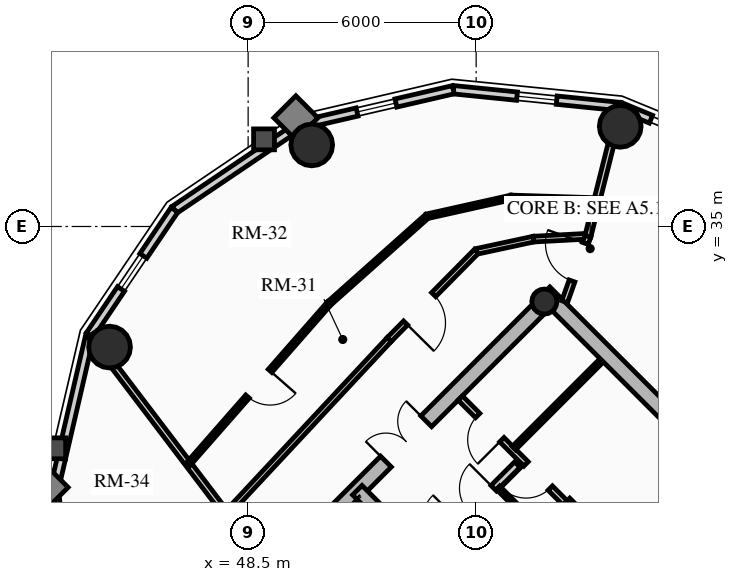
"""IFC4 building model, lengths in metres.
Left out: names, types, materials, properties, quantities, classifications, styles, units other than length and angle.
Written with IfcOpenShell. Run it as: python <this file> out.ifc"""

import sys

from ifc_helpers import new_model, si_unit, direction, frame, frame_2d, origin, origin_2d, place, context, subcontext, project, spatial, rectangle, circle, hollow_circle, extrude, source, transform, mapped, element, fill, save


model = new_model("IFC4")
c1 = context("Model", 3, precision=1e-05, world=origin(), true_north=direction((0.0, 1.0)))
c2 = subcontext(c1, "Body", "Model", "MODEL_VIEW")
j1 = project(units=[si_unit("LENGTHUNIT", "METRE"), si_unit("PLANEANGLEUNIT", "RADIAN")], contexts=[c1])
p1 = place(None, origin())
s1 = spatial("IfcSite", under=j1, at=p1, CompositionType="ELEMENT")
p2 = place(p1, origin())
s2 = spatial("IfcBuilding", under=s1, at=p2, CompositionType="ELEMENT")
p3 = place(p2, frame((0.0, 0.0, 219.94)))
s3 = spatial("IfcBuildingStorey", under=s2, at=p3, CompositionType="ELEMENT", Elevation=219.94)
p4 = place(p3, frame((66.268, 23.298, 0.0), z_axis=(0.0, 0.0, 1.0), x_axis=(-0.707106781187, 0.707106781187, 0.0)))
e1 = element("IfcWall", 1, at=p4, inside=s3, PredefinedType="SHEAR", context=c2, shape_type="SweptSolid", body=[
    extrude(rectangle(XDim=14.1, YDim=0.4, at=frame_2d((7.05, 0.0))), origin(), (0.0, 0.0, 1.0), 2.91),
])
p5 = place(p3, frame((48.873, 25.561, 0.0), z_axis=(0.0, 0.0, 1.0), x_axis=(0.707106781187, 0.707106781187, 0.0)))
e2 = element("IfcWall", 2, at=p5, inside=s3, PredefinedType="SHEAR", context=c2, shape_type="SweptSolid", body=[
    extrude(rectangle(XDim=10.7, YDim=0.4, at=frame_2d((5.35, 0.0))), origin(), (0.0, 0.0, 1.0), 2.91),
])
m1 = source(origin(), c2, "Body", "SweptSolid", [
    extrude(rectangle(XDim=1.5, YDim=2.02, at=frame_2d((0.75, 1.01))), frame((0.0, 0.21, 0.0), z_axis=(0.0, -1.0, 0.0), x_axis=(1.0, 0.0, 0.0)), (0.0, 0.0, 1.0), 0.42),
])
p6 = place(p5, frame((4.6, 0.0, 0.0)))
e3 = element("IfcOpeningElement", 3, at=p6, cuts=e2, PredefinedType="OPENING", context=c2, shape_type="MappedRepresentation", body=[
    mapped(m1, transform((0.0, 0.0, 0.0), x_axis=(1.0, 0.0, 0.0), y_axis=(0.0, 1.0, 0.0), z_axis=(0.0, 0.0, 1.0), scale=1.0)),
])
p7 = place(p3, frame((61.06, 18.373, 0.0), z_axis=(0.0, 0.0, 1.0), x_axis=(-0.707106781187, 0.707106781187, 0.0)))
e4 = element("IfcWall", 4, at=p7, inside=s3, PredefinedType="SHEAR", context=c2, shape_type="SweptSolid", body=[
    extrude(rectangle(XDim=13.7, YDim=0.35, at=frame_2d((6.85, 0.0))), origin(), (0.0, 0.0, 1.0), 2.91),
])
m2 = source(origin(), c2, "Body", "SweptSolid", [
    extrude(rectangle(XDim=1.1, YDim=2.015, at=frame_2d((0.55, 1.007))), frame((0.0, 0.185, 0.0), z_axis=(0.0, -1.0, 0.0), x_axis=(1.0, 0.0, 0.0)), (0.0, 0.0, 1.0), 0.37),
])
p8 = place(p7, frame((4.85, 0.0, 0.0)))
e5 = element("IfcOpeningElement", 5, at=p8, cuts=e4, PredefinedType="OPENING", context=c2, shape_type="MappedRepresentation", body=[
    mapped(m2, transform((0.0, 0.0, 0.0), x_axis=(1.0, 0.0, 0.0), y_axis=(0.0, 1.0, 0.0), z_axis=(0.0, 0.0, 1.0), scale=1.0)),
])
p9 = place(p7, frame((0.625, 0.0, 0.0)))
e6 = element("IfcOpeningElement", 6, at=p9, cuts=e4, PredefinedType="OPENING", context=c2, shape_type="MappedRepresentation", body=[
    mapped(m2, transform((0.0, 0.0, 0.0), x_axis=(1.0, 0.0, 0.0), y_axis=(0.0, 1.0, 0.0), z_axis=(0.0, 0.0, 1.0), scale=1.0)),
])
p10 = place(p7, frame((2.625, 0.0, 0.0)))
e7 = element("IfcOpeningElement", 7, at=p10, cuts=e4, PredefinedType="OPENING", context=c2, shape_type="MappedRepresentation", body=[
    mapped(m2, transform((0.0, 0.0, 0.0), x_axis=(1.0, 0.0, 0.0), y_axis=(0.0, 1.0, 0.0), z_axis=(0.0, 0.0, 1.0), scale=1.0)),
])
m3 = source(origin(), c2, "Body", "SweptSolid", [
    extrude(rectangle(XDim=1.15, YDim=2.02, at=frame_2d((0.575, 1.01))), frame((0.0, 0.185, 0.0), z_axis=(0.0, -1.0, 0.0), x_axis=(1.0, 0.0, 0.0)), (0.0, 0.0, 1.0), 0.37),
])
p11 = place(p7, frame((7.27, 0.0, 0.0)))
e8 = element("IfcOpeningElement", 8, at=p11, cuts=e4, PredefinedType="OPENING", context=c2, shape_type="MappedRepresentation", body=[
    mapped(m3, transform((0.0, 0.0, 0.0), x_axis=(1.0, 0.0, 0.0), y_axis=(0.0, 1.0, 0.0), z_axis=(0.0, 0.0, 1.0), scale=1.0)),
])
p12 = place(p3, frame((63.627, 20.94, 0.0), z_axis=(0.0, 0.0, 1.0), x_axis=(-0.707119496762, 0.707094065383, 0.0)))
e9 = element("IfcWall", 9, at=p12, inside=s3, PredefinedType="SHEAR", context=c2, shape_type="SweptSolid", body=[
    extrude(rectangle(XDim=9.6, YDim=0.35, at=frame_2d((4.8, 0.0))), origin(), (0.0, 0.0, 1.0), 2.91),
])
p13 = place(p12, frame((5.28, 0.0, 0.0)))
e10 = element("IfcOpeningElement", 10, at=p13, cuts=e9, PredefinedType="OPENING", context=c2, shape_type="MappedRepresentation", body=[
    mapped(m3, transform((0.0, 0.0, 0.0), x_axis=(1.0, 0.0, 0.0), y_axis=(0.0, 1.0, 0.0), z_axis=(0.0, 0.0, 1.0), scale=1.0)),
])
p14 = place(p3, frame((58.893, 25.674, 0.0), z_axis=(0.0, 0.0, 1.0), x_axis=(0.707106781187, 0.707106781187, 0.0)))
e11 = element("IfcWall", 11, at=p14, inside=s3, PredefinedType="SHEAR", context=c2, shape_type="SweptSolid", body=[
    extrude(rectangle(XDim=3.285, YDim=0.35, at=frame_2d((1.643, 0.0))), origin(), (0.0, 0.0, 1.0), 2.91),
])
p15 = place(p3, frame((56.294, 33.024, 0.0), z_axis=(0.0, 0.0, 1.0), x_axis=(0.707106781187, 0.707106781187, 0.0)))
e12 = element("IfcColumn", 12, at=p15, inside=s3, PredefinedType="COLUMN", context=c2, shape_type="SweptSolid", body=[
    extrude(hollow_circle(Radius=0.33, WallThickness=0.025, at=origin_2d()), origin(), (0.0, 0.0, 1.0), 2.91),
])
for number, where, z_axis, x_axis in (
    (13, (58.291, 37.635, 0.0), (0.0, 0.0, 1.0), (1.0, 0.0, 0.0)),
    (14, (50.173, 37.146, 0.0), (0.0, 0.0, 1.0), (1.0, 0.0, 0.0)),
    (15, (44.854, 31.827, 0.0), (0.0, 0.0, 1.0), (1.0, 0.0, 0.0)),
):
    element("IfcColumn", number, at=place(p3, frame(where, z_axis=z_axis, x_axis=x_axis)), inside=s3, PredefinedType="USERDEFINED", context=c2, shape_type="SweptSolid", body=[
        extrude(circle(Radius=0.55, at=origin_2d()), origin(), (0.0, 0.0, 1.0), 2.91),
    ])
p16 = place(p3, frame((58.295, 38.155, 0.0), z_axis=(0.0, 0.0, 1.0), x_axis=(0.924515260676, -0.381145028536, 0.0)))
e16 = element("IfcWall", 16, at=p16, inside=s3, PredefinedType="SOLIDWALL", context=c2, shape_type="SweptSolid", body=[
    extrude(rectangle(XDim=0.87, YDim=0.22, at=frame_2d((0.435, 0.0))), origin(), (0.0, 0.0, 1.0), 2.322),
])
p17 = place(p3, frame((53.9, 38.599, 0.0), z_axis=(0.0, 0.0, 1.0), x_axis=(0.994929930991, -0.100570534541, 0.0)))
e17 = element("IfcWall", 17, at=p17, inside=s3, PredefinedType="SOLIDWALL", context=c2, shape_type="SweptSolid", body=[
    extrude(rectangle(XDim=4.418, YDim=0.22, at=frame_2d((2.209, 0.0))), origin(), (0.0, 0.0, 1.0), 2.322),
])
m4 = source(origin(), c2, "Body", "SweptSolid", [
    extrude(rectangle(XDim=1.05, YDim=1.3, at=frame_2d((0.525, 0.65))), frame((0.0, 0.12, 0.0), z_axis=(0.0, -1.0, 0.0), x_axis=(1.0, 0.0, 0.0)), (0.0, 0.0, 1.0), 0.24),
])
p18 = place(p17, frame((1.684, 0.0, 0.65)))
e18 = element("IfcOpeningElement", 18, at=p18, cuts=e17, PredefinedType="OPENING", context=c2, shape_type="MappedRepresentation", body=[
    mapped(m4, transform((0.0, 0.0, 0.0), x_axis=(1.0, 0.0, 0.0), y_axis=(0.0, 1.0, 0.0), z_axis=(0.0, 0.0, 1.0), scale=1.0)),
])
p19 = place(p3, frame((49.856, 37.663, 0.0), z_axis=(0.0, 0.0, 1.0), x_axis=(0.974249228678, 0.225473813158, 0.0)))
e19 = element("IfcWall", 19, at=p19, inside=s3, PredefinedType="SOLIDWALL", context=c2, shape_type="SweptSolid", body=[
    extrude(rectangle(XDim=4.15, YDim=0.22, at=frame_2d((2.075, 0.0))), origin(), (0.0, 0.0, 1.0), 2.322),
])
p20 = place(p19, frame((1.55, 0.0, 0.65)))
e20 = element("IfcOpeningElement", 20, at=p20, cuts=e19, PredefinedType="OPENING", context=c2, shape_type="MappedRepresentation", body=[
    mapped(m4, transform((0.0, 0.0, 0.0), x_axis=(1.0, 0.0, 0.0), y_axis=(0.0, 1.0, 0.0), z_axis=(0.0, 0.0, 1.0), scale=1.0)),
])
p21 = place(p3, frame((46.561, 35.439, 0.0), z_axis=(0.0, 0.0, 1.0), x_axis=(0.828833723692, 0.559495003079, 0.0)))
e21 = element("IfcWall", 21, at=p21, inside=s3, PredefinedType="SOLIDWALL", context=c2, shape_type="SweptSolid", body=[
    extrude(rectangle(XDim=3.976, YDim=0.22, at=frame_2d((1.988, 0.0))), origin(), (0.0, 0.0, 1.0), 2.322),
])
p22 = place(p3, frame((44.337, 32.144, 0.0), z_axis=(0.0, 0.0, 1.0), x_axis=(0.559495003079, 0.828833723692, 0.0)))
e22 = element("IfcWall", 22, at=p22, inside=s3, PredefinedType="SOLIDWALL", context=c2, shape_type="SweptSolid", body=[
    extrude(rectangle(XDim=3.976, YDim=0.22, at=frame_2d((1.988, 0.0))), origin(), (0.0, 0.0, 1.0), 2.322),
])
p23 = place(p22, frame((1.463, 0.0, 0.65)))
e23 = element("IfcOpeningElement", 23, at=p23, cuts=e22, PredefinedType="OPENING", context=c2, shape_type="MappedRepresentation", body=[
    mapped(m4, transform((0.0, 0.0, 0.0), x_axis=(1.0, 0.0, 0.0), y_axis=(0.0, 1.0, 0.0), z_axis=(0.0, 0.0, 1.0), scale=1.0)),
])
p24 = place(p3, frame((43.401, 28.1, 0.0), z_axis=(0.0, 0.0, 1.0), x_axis=(0.225473813158, 0.974249228678, 0.0)))
e24 = element("IfcWall", 24, at=p24, inside=s3, PredefinedType="SOLIDWALL", context=c2, shape_type="SweptSolid", body=[
    extrude(rectangle(XDim=4.15, YDim=0.22, at=frame_2d((2.075, 0.0))), origin(), (0.0, 0.0, 1.0), 2.322),
])
p25 = place(p3, frame((43.845, 23.705, 0.0), z_axis=(0.0, 0.0, 1.0), x_axis=(-0.100570534541, 0.994929930991, 0.0)))
e25 = element("IfcWall", 25, at=p25, inside=s3, PredefinedType="SOLIDWALL", context=c2, shape_type="SweptSolid", body=[
    extrude(rectangle(XDim=4.418, YDim=0.22, at=frame_2d((2.209, 0.0))), origin(), (0.0, 0.0, 1.0), 2.322),
])
p26 = place(p25, frame((1.684, 0.0, 0.65)))
e26 = element("IfcOpeningElement", 26, at=p26, cuts=e25, PredefinedType="OPENING", context=c2, shape_type="MappedRepresentation", body=[
    mapped(m4, transform((0.0, 0.0, 0.0), x_axis=(1.0, 0.0, 0.0), y_axis=(0.0, 1.0, 0.0), z_axis=(0.0, 0.0, 1.0), scale=1.0)),
])
p27 = place(p3, frame((53.264, 26.416, 0.0), z_axis=(0.0, 0.0, 1.0), x_axis=(0.707106781187, 0.707106781187, 0.0)))
e27 = element("IfcWall", 27, at=p27, inside=s3, PredefinedType="PARTITIONING", context=c2, shape_type="SweptSolid", body=[
    extrude(rectangle(XDim=3.28, YDim=0.2, at=frame_2d((1.64, 0.0))), origin(), (0.0, 0.0, 1.0), 2.685),
])
m5 = source(origin(), c2, "Body", "SweptSolid", [
    extrude(rectangle(XDim=1.0, YDim=2.015, at=frame_2d((0.5, 1.007))), frame((0.0, 0.11, 0.0), z_axis=(0.0, -1.0, 0.0), x_axis=(1.0, 0.0, 0.0)), (0.0, 0.0, 1.0), 0.22),
])
p28 = place(p27, frame((0.14, 0.0, 0.0)))
e28 = element("IfcOpeningElement", 28, at=p28, cuts=e27, PredefinedType="OPENING", context=c2, shape_type="MappedRepresentation", body=[
    mapped(m5, transform((0.0, 0.0, 0.0), x_axis=(1.0, 0.0, 0.0), y_axis=(0.0, 1.0, 0.0), z_axis=(0.0, 0.0, 1.0), scale=1.0)),
])
m6 = source(origin(), c2, "Body", "SweptSolid", [
    extrude(rectangle(XDim=0.9, YDim=2.005, at=frame_2d((0.45, 1.002))), frame((0.0, 0.11, 0.0), z_axis=(0.0, -1.0, 0.0), x_axis=(1.0, 0.0, 0.0)), (0.0, 0.0, 1.0), 0.22),
])
p29 = place(p27, frame((1.5, 0.0, 0.0)))
e29 = element("IfcOpeningElement", 29, at=p29, cuts=e27, PredefinedType="OPENING", context=c2, shape_type="MappedRepresentation", body=[
    mapped(m6, transform((0.0, 0.0, 0.0), x_axis=(1.0, 0.0, 0.0), y_axis=(0.0, 1.0, 0.0), z_axis=(0.0, 0.0, 1.0), scale=1.0)),
])
p30 = place(p3, frame((56.673, 26.529, 0.0), z_axis=(0.0, 0.0, 1.0), x_axis=(-0.707052764397, 0.70716079385, 0.0)))
e30 = element("IfcWall", 30, at=p30, inside=s3, PredefinedType="PARTITIONING", context=c2, shape_type="SweptSolid", body=[
    extrude(rectangle(XDim=2.26, YDim=0.125, at=frame_2d((1.13, 0.0))), origin(), (0.0, 0.0, 1.0), 2.685),
])
m7 = source(origin(), c2, "Body", "SweptSolid", [
    extrude(rectangle(XDim=0.9, YDim=2.005, at=frame_2d((0.45, 1.002))), frame((0.0, 0.073, 0.0), z_axis=(0.0, -1.0, 0.0), x_axis=(1.0, 0.0, 0.0)), (0.0, 0.0, 1.0), 0.145),
])
p31 = place(p30, frame((0.65, 0.0, 0.0)))
e31 = element("IfcOpeningElement", 31, at=p31, cuts=e30, PredefinedType="OPENING", context=c2, shape_type="MappedRepresentation", body=[
    mapped(m7, transform((0.0, 0.0, 0.0), x_axis=(1.0, 0.0, 0.0), y_axis=(0.0, 1.0, 0.0), z_axis=(0.0, 0.0, 1.0), scale=1.0)),
])
p32 = place(p3, frame((56.839, 27.728, 0.0), z_axis=(0.0, 0.0, 1.0), x_axis=(-0.707106781187, 0.707106781187, 0.0)))
e32 = element("IfcWall", 32, at=p32, inside=s3, PredefinedType="PARTITIONING", context=c2, shape_type="SweptSolid", body=[
    extrude(rectangle(XDim=3.9, YDim=0.16, at=frame_2d((1.95, 0.0))), origin(), (0.0, 0.0, 1.0), 2.685),
])
m8 = source(origin(), c2, "Body", "SweptSolid", [
    extrude(rectangle(XDim=0.9, YDim=2.005, at=frame_2d((0.45, 1.002))), frame((0.0, 0.09, 0.0), z_axis=(0.0, -1.0, 0.0), x_axis=(1.0, 0.0, 0.0)), (0.0, 0.0, 1.0), 0.18),
])
p33 = place(p32, frame((0.55, 0.0, 0.0)))
e33 = element("IfcOpeningElement", 33, at=p33, cuts=e32, PredefinedType="OPENING", context=c2, shape_type="MappedRepresentation", body=[
    mapped(m8, transform((0.0, 0.0, 0.0), x_axis=(1.0, 0.0, 0.0), y_axis=(0.0, 1.0, 0.0), z_axis=(0.0, 0.0, 1.0), scale=1.0)),
])
p34 = place(p32, frame((2.35, 0.0, 0.0)))
e34 = element("IfcOpeningElement", 34, at=p34, cuts=e32, PredefinedType="OPENING", context=c2, shape_type="MappedRepresentation", body=[
    mapped(m8, transform((0.0, 0.0, 0.0), x_axis=(1.0, 0.0, 0.0), y_axis=(0.0, 1.0, 0.0), z_axis=(0.0, 0.0, 1.0), scale=1.0)),
])
p35 = place(p3, frame((55.492, 29.167, 0.0), z_axis=(0.0, 0.0, 1.0), x_axis=(0.707144688645, 0.707068871696, 0.0)))
e35 = element("IfcWall", 35, at=p35, inside=s3, PredefinedType="PARTITIONING", context=c2, shape_type="SweptSolid", body=[
    extrude(rectangle(XDim=3.22, YDim=0.125, at=frame_2d((1.61, 0.0))), origin(), (0.0, 0.0, 1.0), 2.222),
])
p36 = place(p3, frame((57.44, 34.744, 0.0), z_axis=(0.0, 0.0, 1.0), x_axis=(-0.998578025565, -0.053309725738, 0.0)))
e36 = element("IfcWall", 36, at=p36, inside=s3, PredefinedType="PARTITIONING", context=c2, shape_type="SweptSolid", body=[
    extrude(rectangle(XDim=1.433, YDim=0.15, at=frame_2d((0.717, 0.0))), origin(), (0.0, 0.0, 1.0), 2.322),
])
p37 = place(p3, frame((56.009, 34.667, 0.0), z_axis=(0.0, 0.0, 1.0), x_axis=(-0.977625498152, -0.210353001795, 0.0)))
e37 = element("IfcWall", 37, at=p37, inside=s3, PredefinedType="PARTITIONING", context=c2, shape_type="SweptSolid", body=[
    extrude(rectangle(XDim=1.538, YDim=0.15, at=frame_2d((0.769, 0.0))), origin(), (0.0, 0.0, 1.0), 2.255),
])
p38 = place(p3, frame((54.506, 34.344, 0.0), z_axis=(0.0, 0.0, 1.0), x_axis=(-0.703053402247, -0.711137056824, 0.0)))
e38 = element("IfcWall", 38, at=p38, inside=s3, PredefinedType="PARTITIONING", context=c2, shape_type="SweptSolid", body=[
    extrude(rectangle(XDim=3.262, YDim=0.15, at=frame_2d((1.631, 0.0))), origin(), (0.0, 0.0, 1.0), 2.322),
])
m9 = source(origin(), c2, "Body", "SweptSolid", [
    extrude(rectangle(XDim=1.05, YDim=2.015, at=frame_2d((0.525, 1.007))), frame((0.0, 0.085, 0.0), z_axis=(0.0, -1.0, 0.0), x_axis=(1.0, 0.0, 0.0)), (0.0, 0.0, 1.0), 0.17),
])
p39 = place(p38, frame((1.599, 0.0, 0.0)))
e39 = element("IfcOpeningElement", 39, at=p39, cuts=e38, PredefinedType="OPENING", context=c2, shape_type="MappedRepresentation", body=[
    mapped(m9, transform((0.0, 0.0, 0.0), x_axis=(1.0, 0.0, 0.0), y_axis=(0.0, 1.0, 0.0), z_axis=(0.0, 0.0, 1.0), scale=1.0)),
])
p40 = place(p3, frame((52.212, 32.024, 0.0), z_axis=(0.0, 0.0, 1.0), x_axis=(-0.682158998173, -0.731203871169, 0.0)))
e40 = element("IfcWall", 40, at=p40, inside=s3, PredefinedType="PARTITIONING", context=c2, shape_type="SweptSolid", body=[
    extrude(rectangle(XDim=6.282, YDim=0.15, at=frame_2d((3.141, 0.0))), origin(), (0.0, 0.0, 1.0), 2.255),
])
p41 = place(p3, frame((57.44, 34.744, 0.0), z_axis=(0.0, 0.0, 1.0), x_axis=(0.243619816457, 0.969870808422, 0.0)))
e41 = element("IfcWall", 41, at=p41, inside=s3, PredefinedType="PARTITIONING", context=c2, shape_type="SweptSolid", body=[
    extrude(rectangle(XDim=3.496, YDim=0.16, at=frame_2d((1.748, 0.0))), origin(), (0.0, 0.0, 1.0), 2.322),
])
p42 = place(p3, frame((47.927, 27.431, 0.0), z_axis=(0.0, 0.0, 1.0), x_axis=(-0.604823333103, 0.796359677366, 0.0)))
e42 = element("IfcWall", 42, at=p42, inside=s3, PredefinedType="PARTITIONING", context=c2, shape_type="SweptSolid", body=[
    extrude(rectangle(XDim=5.907, YDim=0.16, at=frame_2d((2.953, 0.0))), origin(), (0.0, 0.0, 1.0), 2.322),
])
p43 = place(p3, frame((56.828, 33.021, 0.0), z_axis=(0.0, 0.0, 1.0), x_axis=(0.334788446034, 0.942293317605, 0.0)))
e43 = element("IfcWall", 43, at=p43, inside=s3, PredefinedType="PARTITIONING", context=c2, shape_type="SweptSolid", body=[
    extrude(rectangle(XDim=1.829, YDim=0.16, at=frame_2d((0.915, 0.0))), origin(), (0.0, 0.0, 1.0), 2.255),
])
m10 = source(origin(), c2, "Body", "SweptSolid", [
    extrude(rectangle(XDim=1.05, YDim=2.015, at=frame_2d((0.525, 1.007))), frame((0.0, 0.09, 0.0), z_axis=(0.0, -1.0, 0.0), x_axis=(1.0, 0.0, 0.0)), (0.0, 0.0, 1.0), 0.18),
])
p44 = place(p43, frame((0.579, 0.0, 0.0)))
e44 = element("IfcOpeningElement", 44, at=p44, cuts=e43, PredefinedType="OPENING", context=c2, shape_type="MappedRepresentation", body=[
    mapped(m10, transform((0.0, 0.0, 0.0), x_axis=(1.0, 0.0, 0.0), y_axis=(0.0, 1.0, 0.0), z_axis=(0.0, 0.0, 1.0), scale=1.0)),
])
p45 = place(p3, frame((57.679, 35.693, 0.0), z_axis=(0.0, 0.0, 1.0), x_axis=(-0.999526298938, 0.030776252722, 0.0)))
e45 = element("IfcWall", 45, at=p45, inside=s3, PredefinedType="PARTITIONING", context=c2, shape_type="SweptSolid", body=[
    extrude(rectangle(XDim=2.261, YDim=0.125, at=frame_2d((1.13, 0.0))), origin(), (0.0, 0.0, 1.0), 2.322),
])
p46 = place(p3, frame((55.419, 35.763, 0.0), z_axis=(0.0, 0.0, 1.0), x_axis=(-0.975917771425, -0.218138725166, 0.0)))
e46 = element("IfcWall", 46, at=p46, inside=s3, PredefinedType="PARTITIONING", context=c2, shape_type="SweptSolid", body=[
    extrude(rectangle(XDim=2.268, YDim=0.125, at=frame_2d((1.134, 0.0))), origin(), (0.0, 0.0, 1.0), 2.255),
])
p47 = place(p3, frame((53.206, 35.268, 0.0), z_axis=(0.0, 0.0, 1.0), x_axis=(-0.746677760999, -0.665185929819, 0.0)))
e47 = element("IfcWall", 47, at=p47, inside=s3, PredefinedType="PARTITIONING", context=c2, shape_type="SweptSolid", body=[
    extrude(rectangle(XDim=3.445, YDim=0.125, at=frame_2d((1.723, 0.0))), origin(), (0.0, 0.0, 1.0), 2.322),
])
p48 = place(p3, frame((50.634, 32.977, 0.0), z_axis=(0.0, 0.0, 1.0), x_axis=(-0.659241945747, -0.751930885765, 0.0)))
e48 = element("IfcWall", 48, at=p48, inside=s3, PredefinedType="PARTITIONING", context=c2, shape_type="SweptSolid", body=[
    extrude(rectangle(XDim=5.624, YDim=0.125, at=frame_2d((2.812, 0.0))), origin(), (0.0, 0.0, 1.0), 2.255),
])
p49 = place(p48, frame((2.362, 0.0, 0.0)))
e49 = element("IfcOpeningElement", 49, at=p49, cuts=e48, PredefinedType="OPENING", context=c2, shape_type="MappedRepresentation", body=[
    mapped(m7, transform((0.0, 0.0, 0.0), x_axis=(1.0, 0.0, 0.0), y_axis=(0.0, 1.0, 0.0), z_axis=(0.0, 0.0, 1.0), scale=1.0)),
])
m11 = source(origin(), c2, "Body", "SweptSolid", [
    extrude(rectangle(XDim=1.05, YDim=1.3, at=frame_2d((0.525, 0.65))), frame((0.0, 0.03, 0.0), z_axis=(0.0, -1.0, 0.0), x_axis=(1.0, 0.0, 0.0)), (0.0, 0.0, 1.0), 0.06),
])
p50 = place(p18, origin())
e50 = element("IfcWindow", 50, at=p50, inside=s3, PartitioningType="SINGLE_PANEL", PredefinedType="WINDOW", context=c2, shape_type="MappedRepresentation", body=[
    mapped(m11, transform((0.0, 0.0, 0.0), x_axis=(1.0, 0.0, 0.0), y_axis=(0.0, 1.0, 0.0), z_axis=(0.0, 0.0, 1.0), scale=1.0)),
])
fill(e18, e50)
p51 = place(p20, origin())
e51 = element("IfcWindow", 51, at=p51, inside=s3, PartitioningType="SINGLE_PANEL", PredefinedType="WINDOW", context=c2, shape_type="MappedRepresentation", body=[
    mapped(m11, transform((0.0, 0.0, 0.0), x_axis=(1.0, 0.0, 0.0), y_axis=(0.0, 1.0, 0.0), z_axis=(0.0, 0.0, 1.0), scale=1.0)),
])
fill(e20, e51)
p52 = place(p23, origin())
e52 = element("IfcWindow", 52, at=p52, inside=s3, PartitioningType="SINGLE_PANEL", PredefinedType="WINDOW", context=c2, shape_type="MappedRepresentation", body=[
    mapped(m11, transform((0.0, 0.0, 0.0), x_axis=(1.0, 0.0, 0.0), y_axis=(0.0, 1.0, 0.0), z_axis=(0.0, 0.0, 1.0), scale=1.0)),
])
fill(e23, e52)
m12 = source(origin(), c2, "Body", "SweptSolid", [
    extrude(rectangle(XDim=1.5, YDim=2.02, at=frame_2d((0.75, 1.01))), frame((0.0, 0.025, 0.0), z_axis=(0.0, -1.0, 0.0), x_axis=(1.0, 0.0, 0.0)), (0.0, 0.0, 1.0), 0.05),
])
p53 = place(p6, origin())
e53 = element("IfcDoor", 53, at=p53, inside=s3, OperationType="DOUBLE_DOOR_SINGLE_SWING", PredefinedType="DOOR", context=c2, shape_type="MappedRepresentation", body=[
    mapped(m12, transform((0.0, 0.0, 0.0), x_axis=(1.0, 0.0, 0.0), y_axis=(0.0, 1.0, 0.0), z_axis=(0.0, 0.0, 1.0), scale=1.0)),
])
fill(e3, e53)
m13 = source(origin(), c2, "Body", "SweptSolid", [
    extrude(rectangle(XDim=0.9, YDim=2.005, at=frame_2d((0.45, 1.002))), frame((0.0, 0.025, 0.0), z_axis=(0.0, -1.0, 0.0), x_axis=(1.0, 0.0, 0.0)), (0.0, 0.0, 1.0), 0.05),
])
p54 = place(p29, origin())
e54 = element("IfcDoor", 54, at=p54, inside=s3, OperationType="SINGLE_SWING_RIGHT", PredefinedType="DOOR", context=c2, shape_type="MappedRepresentation", body=[
    mapped(m13, transform((0.0, 0.0, 0.0), x_axis=(1.0, 0.0, 0.0), y_axis=(0.0, 1.0, 0.0), z_axis=(0.0, 0.0, 1.0), scale=1.0)),
])
fill(e29, e54)
p55 = place(p33, origin())
e55 = element("IfcDoor", 55, at=p55, inside=s3, OperationType="SINGLE_SWING_RIGHT", PredefinedType="DOOR", context=c2, shape_type="MappedRepresentation", body=[
    mapped(m13, transform((0.0, 0.0, 0.0), x_axis=(1.0, 0.0, 0.0), y_axis=(0.0, 1.0, 0.0), z_axis=(0.0, 0.0, 1.0), scale=1.0)),
])
fill(e33, e55)
p56 = place(p34, origin())
e56 = element("IfcDoor", 56, at=p56, inside=s3, OperationType="SINGLE_SWING_LEFT", PredefinedType="DOOR", context=c2, shape_type="MappedRepresentation", body=[
    mapped(m13, transform((0.0, 0.0, 0.0), x_axis=(1.0, 0.0, 0.0), y_axis=(0.0, 1.0, 0.0), z_axis=(0.0, 0.0, 1.0), scale=1.0)),
])
fill(e34, e56)
m14 = source(origin(), c2, "Body", "SweptSolid", [
    extrude(rectangle(XDim=1.05, YDim=2.015, at=frame_2d((0.525, 1.007))), frame((0.0, 0.025, 0.0), z_axis=(0.0, -1.0, 0.0), x_axis=(1.0, 0.0, 0.0)), (0.0, 0.0, 1.0), 0.05),
])
p57 = place(p44, origin())
e57 = element("IfcDoor", 57, at=p57, inside=s3, OperationType="SINGLE_SWING_RIGHT", PredefinedType="DOOR", context=c2, shape_type="MappedRepresentation", body=[
    mapped(m14, transform((0.0, 0.0, 0.0), x_axis=(1.0, 0.0, 0.0), y_axis=(0.0, 1.0, 0.0), z_axis=(0.0, 0.0, 1.0), scale=1.0)),
])
fill(e44, e57)
p58 = place(p39, origin())
e58 = element("IfcDoor", 58, at=p58, inside=s3, OperationType="SINGLE_SWING_RIGHT", PredefinedType="DOOR", context=c2, shape_type="MappedRepresentation", body=[
    mapped(m14, transform((0.0, 0.0, 0.0), x_axis=(1.0, 0.0, 0.0), y_axis=(0.0, 1.0, 0.0), z_axis=(0.0, 0.0, 1.0), scale=1.0)),
])
fill(e39, e58)
p59 = place(p49, origin())
e59 = element("IfcDoor", 59, at=p59, inside=s3, OperationType="SINGLE_SWING_LEFT", PredefinedType="DOOR", context=c2, shape_type="MappedRepresentation", body=[
    mapped(m13, transform((0.0, 0.0, 0.0), x_axis=(1.0, 0.0, 0.0), y_axis=(0.0, 1.0, 0.0), z_axis=(0.0, 0.0, 1.0), scale=1.0)),
])
fill(e49, e59)
save(model, sys.argv[1])
